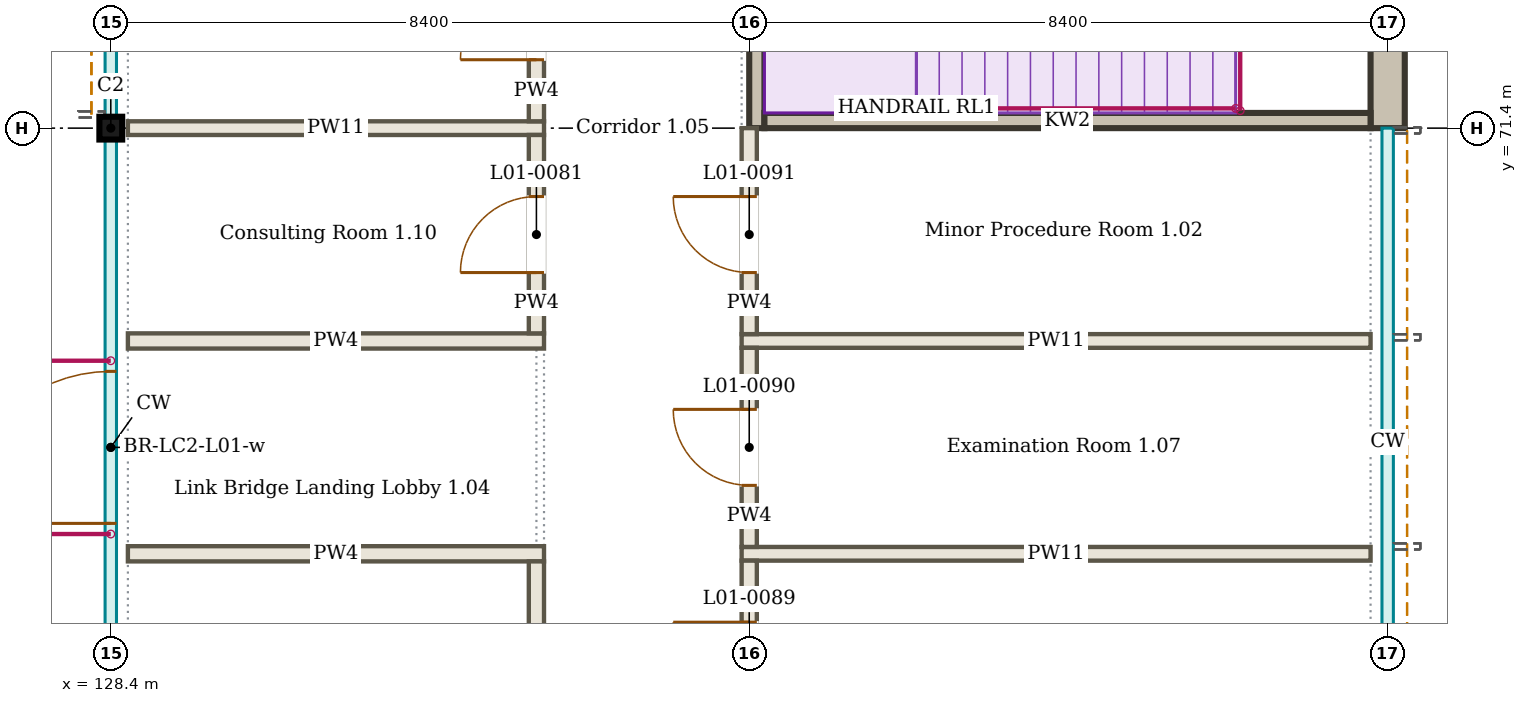
"""IFC4 building model, lengths in metres.
Left out: names, types, materials, properties, quantities, classifications, styles, units other than length and angle.
Written with IfcOpenShell. Run it as: python <this file> out.ifc"""

import sys

from ifc_helpers import new_model, si_unit, direction, frame, frame_2d, origin, origin_2d, place, context, subcontext, project, spatial, rectangle, i_section, extrude, element, fill, save


model = new_model("IFC4")
c1 = context("Model", 3, precision=1e-05, world=origin(), true_north=direction((0.0, 1.0)))
c2 = subcontext(c1, "Body", "Model", "MODEL_VIEW")
j1 = project(units=[si_unit("LENGTHUNIT", "METRE"), si_unit("PLANEANGLEUNIT", "RADIAN")], contexts=[c1])
p1 = place(None, origin())
s1 = spatial("IfcSite", under=j1, at=p1, CompositionType="ELEMENT")
p2 = place(p1, origin())
s2 = spatial("IfcBuilding", under=s1, at=p2, CompositionType="ELEMENT")
p3 = place(p2, frame((0.0, 0.0, 4.5)))
s3 = spatial("IfcBuildingStorey", under=s2, at=p3, CompositionType="ELEMENT", Elevation=4.5)
p4 = place(p3, frame((128.4, 71.4, 0.0), z_axis=(0.0, 0.0, 1.0), x_axis=(1.0, 0.0, 0.0)))
e1 = element("IfcColumn", 1, at=p4, inside=s3, PredefinedType="COLUMN", context=c2, shape_type="SweptSolid", body=[
    extrude(i_section(OverallWidth=0.3, OverallDepth=0.3, WebThickness=0.011, FlangeThickness=0.019, FilletRadius=0.027, at=origin_2d()), origin(), (0.0, 0.0, 1.0), 4.5),
])
p5 = place(p3, frame((128.625, 65.8, 0.0), z_axis=(0.0, 0.0, 1.0), x_axis=(1.0, 0.0, 0.0)))
e2 = element("IfcWall", 2, at=p5, inside=s3, PredefinedType="PARTITIONING", context=c2, shape_type="SweptSolid", body=[
    extrude(rectangle(XDim=5.475, YDim=0.2, at=frame_2d((2.738, 0.0))), origin(), (0.0, 0.0, 1.0), 3.996),
])
p6 = place(p3, frame((136.7, 65.8, 0.0), z_axis=(0.0, 0.0, 1.0), x_axis=(1.0, 0.0, 0.0)))
e3 = element("IfcWall", 3, at=p6, inside=s3, PredefinedType="PARTITIONING", context=c2, shape_type="SweptSolid", body=[
    extrude(rectangle(XDim=8.275, YDim=0.18, at=frame_2d((4.138, 0.0))), origin(), (0.0, 0.0, 1.0), 3.9),
])
p7 = place(p3, frame((128.625, 68.6, 0.0), z_axis=(0.0, 0.0, 1.0), x_axis=(1.0, 0.0, 0.0)))
e4 = element("IfcWall", 4, at=p7, inside=s3, PredefinedType="PARTITIONING", context=c2, shape_type="SweptSolid", body=[
    extrude(rectangle(XDim=5.475, YDim=0.2, at=frame_2d((2.738, 0.0))), origin(), (0.0, 0.0, 1.0), 3.996),
])
p8 = place(p3, frame((136.7, 68.6, 0.0), z_axis=(0.0, 0.0, 1.0), x_axis=(1.0, 0.0, 0.0)))
e5 = element("IfcWall", 5, at=p8, inside=s3, PredefinedType="PARTITIONING", context=c2, shape_type="SweptSolid", body=[
    extrude(rectangle(XDim=8.275, YDim=0.18, at=frame_2d((4.138, 0.0))), origin(), (0.0, 0.0, 1.0), 3.9),
])
p9 = place(p3, frame((128.625, 71.4, 0.0), z_axis=(0.0, 0.0, 1.0), x_axis=(1.0, 0.0, 0.0)))
e6 = element("IfcWall", 6, at=p9, inside=s3, PredefinedType="PARTITIONING", context=c2, shape_type="SweptSolid", body=[
    extrude(rectangle(XDim=5.475, YDim=0.18, at=frame_2d((2.738, 0.0))), origin(), (0.0, 0.0, 1.0), 3.9),
])
p10 = place(p3, frame((134.0, 63.1, 0.0), z_axis=(0.0, 0.0, 1.0), x_axis=(0.0, 1.0, 0.0)))
e7 = element("IfcWall", 7, at=p10, inside=s3, PredefinedType="PARTITIONING", context=c2, shape_type="SweptSolid", body=[
    extrude(rectangle(XDim=2.6, YDim=0.2, at=frame_2d((1.3, 0.0))), origin(), (0.0, 0.0, 1.0), 3.996),
])
p11 = place(p3, frame((134.0, 68.7, 0.0), z_axis=(0.0, 0.0, 1.0), x_axis=(0.0, 1.0, 0.0)))
e8 = element("IfcWall", 8, at=p11, inside=s3, PredefinedType="PARTITIONING", context=c2, shape_type="SweptSolid", body=[
    extrude(rectangle(XDim=2.61, YDim=0.2, at=frame_2d((1.305, 0.0))), origin(), (0.0, 0.0, 1.0), 3.996),
])
p12 = place(p11, frame((0.8, 0.0, 0.0)))
e9 = element("IfcOpeningElement", 9, at=p12, cuts=e8, PredefinedType="OPENING", context=c2, shape_type="SweptSolid", body=[
    extrude(rectangle(XDim=1.0, YDim=2.1, at=frame_2d((0.5, 1.05))), frame((0.0, 0.11, 0.0), z_axis=(0.0, -1.0, 0.0), x_axis=(1.0, 0.0, 0.0)), (0.0, 0.0, 1.0), 0.22),
])
p13 = place(p3, frame((134.0, 71.49, 0.0), z_axis=(0.0, 0.0, 1.0), x_axis=(0.0, 1.0, 0.0)))
e10 = element("IfcWall", 10, at=p13, inside=s3, PredefinedType="PARTITIONING", context=c2, shape_type="SweptSolid", body=[
    extrude(rectangle(XDim=2.635, YDim=0.2, at=frame_2d((1.317, 0.0))), origin(), (0.0, 0.0, 1.0), 3.996),
])
p14 = place(p13, frame((0.81, 0.0, 0.0)))
e11 = element("IfcOpeningElement", 11, at=p14, cuts=e10, PredefinedType="OPENING", context=c2, shape_type="SweptSolid", body=[
    extrude(rectangle(XDim=1.0, YDim=2.1, at=frame_2d((0.5, 1.05))), frame((0.0, 0.11, 0.0), z_axis=(0.0, -1.0, 0.0), x_axis=(1.0, 0.0, 0.0)), (0.0, 0.0, 1.0), 0.22),
])
p15 = place(p3, frame((136.8, 63.15, 0.0), z_axis=(0.0, 0.0, 1.0), x_axis=(0.0, 1.0, 0.0)))
e12 = element("IfcWall", 12, at=p15, inside=s3, PredefinedType="PARTITIONING", context=c2, shape_type="SweptSolid", body=[
    extrude(rectangle(XDim=2.56, YDim=0.2, at=frame_2d((1.28, 0.0))), origin(), (0.0, 0.0, 1.0), 3.9),
])
p16 = place(p15, frame((0.75, 0.0, 0.0)))
e13 = element("IfcOpeningElement", 13, at=p16, cuts=e12, PredefinedType="OPENING", context=c2, shape_type="SweptSolid", body=[
    extrude(rectangle(XDim=1.0, YDim=2.1, at=frame_2d((0.5, 1.05))), frame((0.0, 0.11, 0.0), z_axis=(0.0, -1.0, 0.0), x_axis=(1.0, 0.0, 0.0)), (0.0, 0.0, 1.0), 0.22),
])
p17 = place(p3, frame((136.8, 65.89, 0.0), z_axis=(0.0, 0.0, 1.0), x_axis=(0.0, 1.0, 0.0)))
e14 = element("IfcWall", 14, at=p17, inside=s3, PredefinedType="PARTITIONING", context=c2, shape_type="SweptSolid", body=[
    extrude(rectangle(XDim=2.62, YDim=0.2, at=frame_2d((1.31, 0.0))), origin(), (0.0, 0.0, 1.0), 3.9),
])
p18 = place(p17, frame((0.81, 0.0, 0.0)))
e15 = element("IfcOpeningElement", 15, at=p18, cuts=e14, PredefinedType="OPENING", context=c2, shape_type="SweptSolid", body=[
    extrude(rectangle(XDim=1.0, YDim=2.1, at=frame_2d((0.5, 1.05))), frame((0.0, 0.11, 0.0), z_axis=(0.0, -1.0, 0.0), x_axis=(1.0, 0.0, 0.0)), (0.0, 0.0, 1.0), 0.22),
])
p19 = place(p3, frame((136.8, 68.69, 0.0), z_axis=(0.0, 0.0, 1.0), x_axis=(0.0, 1.0, 0.0)))
e16 = element("IfcWall", 16, at=p19, inside=s3, PredefinedType="PARTITIONING", context=c2, shape_type="SweptSolid", body=[
    extrude(rectangle(XDim=2.71, YDim=0.2, at=frame_2d((1.355, 0.0))), origin(), (0.0, 0.0, 1.0), 3.9),
])
p20 = place(p19, frame((0.81, 0.0, 0.0)))
e17 = element("IfcOpeningElement", 17, at=p20, cuts=e16, PredefinedType="OPENING", context=c2, shape_type="SweptSolid", body=[
    extrude(rectangle(XDim=1.0, YDim=2.1, at=frame_2d((0.5, 1.05))), frame((0.0, 0.11, 0.0), z_axis=(0.0, -1.0, 0.0), x_axis=(1.0, 0.0, 0.0)), (0.0, 0.0, 1.0), 0.22),
])
p21 = place(p3, frame((136.9, 71.4, 0.0), z_axis=(0.0, 0.0, 1.0), x_axis=(0.0, 1.0, 0.0)))
e18 = element("IfcWall", 18, at=p21, inside=s3, PredefinedType="SOLIDWALL", context=c2, shape_type="SweptSolid", body=[
    extrude(rectangle(XDim=8.4, YDim=0.2, at=frame_2d((4.2, 0.0))), origin(), (0.0, 0.0, 1.0), 4.5),
])
p22 = place(p21, frame((4.725, 0.0, 0.0)))
e19 = element("IfcOpeningElement", 19, at=p22, cuts=e18, PredefinedType="OPENING", context=c2, shape_type="SweptSolid", body=[
    extrude(rectangle(XDim=1.3, YDim=2.1, at=frame_2d((0.65, 1.05))), frame((0.0, 0.11, 0.0), z_axis=(0.0, -1.0, 0.0), x_axis=(1.0, 0.0, 0.0)), (0.0, 0.0, 1.0), 0.22),
])
p23 = place(p3, frame((145.2, 71.4, 0.0), z_axis=(0.0, 0.0, 1.0), x_axis=(0.0, 1.0, 0.0)))
e20 = element("IfcWall", 20, at=p23, inside=s3, PredefinedType="SOLIDWALL", context=c2, shape_type="SweptSolid", body=[
    extrude(rectangle(XDim=8.4, YDim=0.45, at=frame_2d((4.2, 0.0))), origin(), (0.0, 0.0, 1.0), 4.5),
])
p24 = place(p3, frame((137.0, 71.5, 0.0), z_axis=(0.0, 0.0, 1.0), x_axis=(1.0, 0.0, 0.0)))
e21 = element("IfcWall", 21, at=p24, inside=s3, PredefinedType="SOLIDWALL", context=c2, shape_type="SweptSolid", body=[
    extrude(rectangle(XDim=7.975, YDim=0.2, at=frame_2d((3.988, 0.0))), origin(), (0.0, 0.0, 1.0), 4.5),
])
p25 = place(p3, frame((128.4, 63.15, 0.0), z_axis=(0.0, 0.0, 1.0), x_axis=(0.0, 1.0, 0.0)))
p26 = place(p25, frame((3.05, 0.0, 0.0)))
p27 = place(p26, origin())
e22 = element("IfcDoor", 22, at=p27, inside=s3, OperationType="SINGLE_SWING_LEFT", PredefinedType="DOOR", context=c2, shape_type="SweptSolid", body=[
    extrude(rectangle(XDim=2.0, YDim=2.4, at=frame_2d((1.0, 1.2))), frame((0.0, 0.025, 0.0), z_axis=(0.0, -1.0, 0.0), x_axis=(1.0, 0.0, 0.0)), (0.0, 0.0, 1.0), 0.05),
])
p28 = place(p12, origin())
e23 = element("IfcDoor", 23, at=p28, inside=s3, OperationType="SINGLE_SWING_LEFT", PredefinedType="DOOR", context=c2, shape_type="SweptSolid", body=[
    extrude(rectangle(XDim=1.0, YDim=2.1, at=frame_2d((0.5, 1.05))), frame((0.0, 0.025, 0.0), z_axis=(0.0, -1.0, 0.0), x_axis=(1.0, 0.0, 0.0)), (0.0, 0.0, 1.0), 0.05),
])
fill(e9, e23)
p29 = place(p14, origin())
e24 = element("IfcDoor", 24, at=p29, inside=s3, OperationType="SINGLE_SWING_LEFT", PredefinedType="DOOR", context=c2, shape_type="SweptSolid", body=[
    extrude(rectangle(XDim=1.0, YDim=2.1, at=frame_2d((0.5, 1.05))), frame((0.0, 0.025, 0.0), z_axis=(0.0, -1.0, 0.0), x_axis=(1.0, 0.0, 0.0)), (0.0, 0.0, 1.0), 0.05),
])
fill(e11, e24)
p30 = place(p16, origin())
e25 = element("IfcDoor", 25, at=p30, inside=s3, OperationType="SINGLE_SWING_RIGHT", PredefinedType="DOOR", context=c2, shape_type="SweptSolid", body=[
    extrude(rectangle(XDim=1.0, YDim=2.1, at=frame_2d((0.5, 1.05))), frame((0.0, 0.025, 0.0), z_axis=(0.0, -1.0, 0.0), x_axis=(1.0, 0.0, 0.0)), (0.0, 0.0, 1.0), 0.05),
])
fill(e13, e25)
p31 = place(p18, origin())
e26 = element("IfcDoor", 26, at=p31, inside=s3, OperationType="SINGLE_SWING_RIGHT", PredefinedType="DOOR", context=c2, shape_type="SweptSolid", body=[
    extrude(rectangle(XDim=1.0, YDim=2.1, at=frame_2d((0.5, 1.05))), frame((0.0, 0.025, 0.0), z_axis=(0.0, -1.0, 0.0), x_axis=(1.0, 0.0, 0.0)), (0.0, 0.0, 1.0), 0.05),
])
fill(e15, e26)
p32 = place(p20, origin())
e27 = element("IfcDoor", 27, at=p32, inside=s3, OperationType="SINGLE_SWING_RIGHT", PredefinedType="DOOR", context=c2, shape_type="SweptSolid", body=[
    extrude(rectangle(XDim=1.0, YDim=2.1, at=frame_2d((0.5, 1.05))), frame((0.0, 0.025, 0.0), z_axis=(0.0, -1.0, 0.0), x_axis=(1.0, 0.0, 0.0)), (0.0, 0.0, 1.0), 0.05),
])
fill(e17, e27)
save(model, sys.argv[1])
